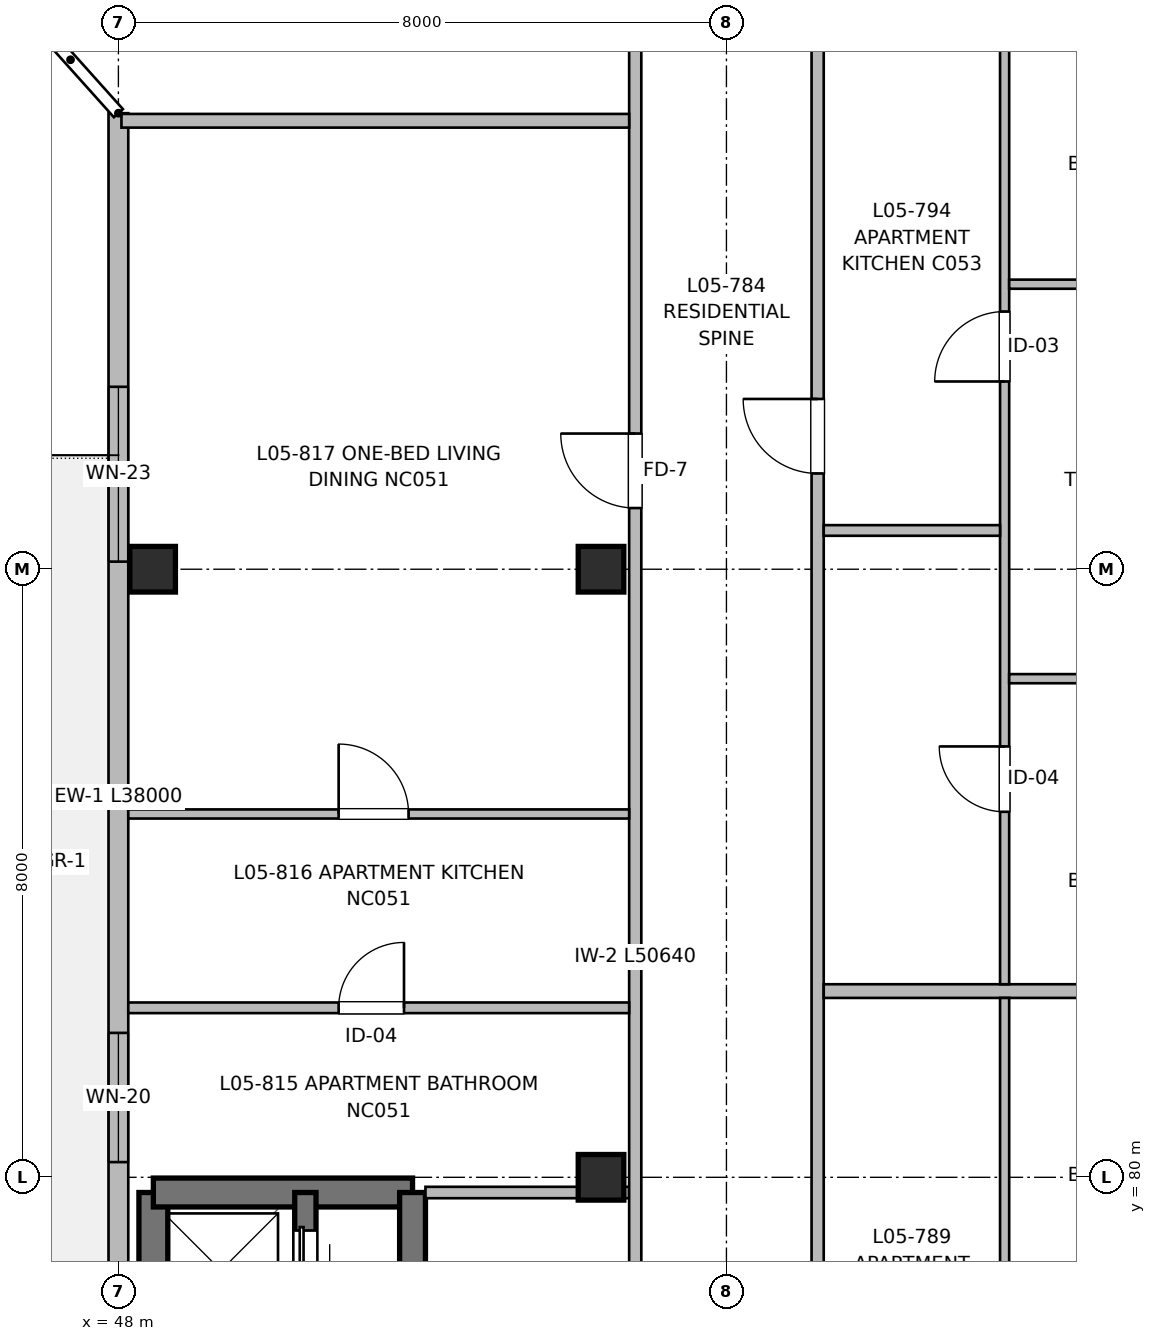
"""IFC4 building model, lengths in metres.
Left out: names, types, materials, properties, quantities, classifications, styles, units other than length and angle.
Written with IfcOpenShell. Run it as: python <this file> out.ifc"""

import sys

from ifc_helpers import new_model, si_unit, direction, frame, frame_2d, origin, origin_2d, place, context, subcontext, project, spatial, rectangle, extrude, element, fill, save


model = new_model("IFC4")
c1 = context("Model", 3, precision=1e-05, world=origin(), true_north=direction((0.0, 1.0)))
c2 = subcontext(c1, "Body", "Model", "MODEL_VIEW")
j1 = project(units=[si_unit("LENGTHUNIT", "METRE"), si_unit("PLANEANGLEUNIT", "RADIAN")], contexts=[c1])
p1 = place(None, origin())
s1 = spatial("IfcSite", under=j1, at=p1, CompositionType="ELEMENT")
p2 = place(p1, origin())
s2 = spatial("IfcBuilding", under=s1, at=p2, CompositionType="ELEMENT")
p3 = place(p2, frame((0.0, 0.0, 16.96)))
s3 = spatial("IfcBuildingStorey", under=s2, at=p3, CompositionType="ELEMENT", Elevation=16.96)
for number, where, z_axis, x_axis in (
    (1, (48.45, 88.0, 0.0), (0.0, 0.0, 1.0), (1.0, 0.0, 0.0)),
    (2, (54.35, 80.0, 0.0), (0.0, 0.0, 1.0), (1.0, 0.0, 0.0)),
    (3, (54.35, 88.0, 0.0), (0.0, 0.0, 1.0), (1.0, 0.0, 0.0)),
):
    element("IfcColumn", number, at=place(p3, frame(where, z_axis=z_axis, x_axis=x_axis)), inside=s3, PredefinedType="COLUMN", context=c2, shape_type="SweptSolid", body=[
        extrude(rectangle(XDim=0.6, YDim=0.6, at=origin_2d()), origin(), (0.0, 0.0, 1.0), 3.2),
    ])
p4 = place(p3, frame((48.46, 67.35, 0.0), z_axis=(0.0, 0.0, 1.0), x_axis=(0.0, 1.0, 0.0)))
e4 = element("IfcWall", 4, at=p4, inside=s3, PredefinedType="SHEAR", context=c2, shape_type="SweptSolid", body=[
    extrude(rectangle(XDim=12.45, YDim=0.38, at=frame_2d((6.225, 0.0))), origin(), (0.0, 0.0, 1.0), 3.2),
])
p5 = place(p4, frame((2.2, 0.0, 0.97)))
e5 = element("IfcOpeningElement", 5, at=p5, cuts=e4, PredefinedType="OPENING", context=c2, shape_type="SweptSolid", body=[
    extrude(rectangle(XDim=0.95, YDim=1.25, at=frame_2d((0.475, 0.625))), frame((0.0, 0.2, 0.0), z_axis=(0.0, -1.0, 0.0), x_axis=(1.0, 0.0, 0.0)), (0.0, 0.0, 1.0), 0.4),
])
p6 = place(p3, frame((48.46, 79.8, 0.0), z_axis=(0.0, 0.0, 1.0), x_axis=(1.0, 0.0, 0.0)))
e6 = element("IfcWall", 6, at=p6, inside=s3, PredefinedType="SHEAR", context=c2, shape_type="SweptSolid", body=[
    extrude(rectangle(XDim=3.41, YDim=0.38, at=frame_2d((1.705, 0.0))), origin(), (0.0, 0.0, 1.0), 3.2),
])
p7 = place(p3, frame((51.87, 79.8, 0.0), z_axis=(0.0, 0.0, 1.0), x_axis=(0.0, -1.0, 0.0)))
e7 = element("IfcWall", 7, at=p7, inside=s3, PredefinedType="SHEAR", context=c2, shape_type="SweptSolid", body=[
    extrude(rectangle(XDim=12.45, YDim=0.34, at=frame_2d((6.225, 0.0))), origin(), (0.0, 0.0, 1.0), 3.2),
])
p8 = place(p7, frame((10.85, 0.0, 0.0)))
e8 = element("IfcOpeningElement", 8, at=p8, cuts=e7, PredefinedType="OPENING", context=c2, shape_type="SweptSolid", body=[
    extrude(rectangle(XDim=1.05, YDim=2.15, at=frame_2d((0.525, 1.075))), frame((0.0, 0.18, 0.0), z_axis=(0.0, -1.0, 0.0), x_axis=(1.0, 0.0, 0.0)), (0.0, 0.0, 1.0), 0.36),
])
p9 = place(p3, frame((50.46, 74.55, 0.0), z_axis=(0.0, 0.0, 1.0), x_axis=(0.0, 1.0, 0.0)))
e9 = element("IfcWall", 9, at=p9, inside=s3, PredefinedType="SHEAR", context=c2, shape_type="SweptSolid", body=[
    extrude(rectangle(XDim=5.25, YDim=0.28, at=frame_2d((2.625, 0.0))), origin(), (0.0, 0.0, 1.0), 3.2),
])
p10 = place(p9, frame((1.15, 0.0, 0.0)))
e10 = element("IfcOpeningElement", 10, at=p10, cuts=e9, PredefinedType="OPENING", context=c2, shape_type="SweptSolid", body=[
    extrude(rectangle(XDim=1.0, YDim=2.15, at=frame_2d((0.5, 1.075))), frame((0.0, 0.15, 0.0), z_axis=(0.0, -1.0, 0.0), x_axis=(1.0, 0.0, 0.0)), (0.0, 0.0, 1.0), 0.3),
])
p11 = place(p9, frame((3.85, 0.0, 0.0)))
e11 = element("IfcOpeningElement", 11, at=p11, cuts=e9, PredefinedType="OPENING", context=c2, shape_type="SweptSolid", body=[
    extrude(rectangle(XDim=0.9, YDim=2.15, at=frame_2d((0.45, 1.075))), frame((0.0, 0.15, 0.0), z_axis=(0.0, -1.0, 0.0), x_axis=(1.0, 0.0, 0.0)), (0.0, 0.0, 1.0), 0.3),
])
p12 = place(p3, frame((48.0, 56.0, 0.0), z_axis=(0.0, 0.0, 1.0), x_axis=(0.0, 1.0, 0.0)))
e12 = element("IfcWall", 12, at=p12, inside=s3, PredefinedType="SOLIDWALL", context=c2, shape_type="SweptSolid", body=[
    extrude(rectangle(XDim=38.0, YDim=0.26, at=frame_2d((19.0, 0.0))), origin(), (0.0, 0.0, 1.0), 2.98),
])
p13 = place(p12, frame((4.15, 0.0, 0.0)))
e13 = element("IfcOpeningElement", 13, at=p13, cuts=e12, PredefinedType="OPENING", context=c2, shape_type="SweptSolid", body=[
    extrude(rectangle(XDim=1.2, YDim=2.2, at=frame_2d((0.6, 1.1))), frame((0.0, 0.14, 0.0), z_axis=(0.0, -1.0, 0.0), x_axis=(1.0, 0.0, 0.0)), (0.0, 0.0, 1.0), 0.28),
])
p14 = place(p12, frame((6.05, 0.0, 0.72)))
e14 = element("IfcOpeningElement", 14, at=p14, cuts=e12, PredefinedType="OPENING", context=c2, shape_type="SweptSolid", body=[
    extrude(rectangle(XDim=1.68, YDim=1.5, at=frame_2d((0.84, 0.75))), frame((0.0, 0.14, 0.0), z_axis=(0.0, -1.0, 0.0), x_axis=(1.0, 0.0, 0.0)), (0.0, 0.0, 1.0), 0.28),
])
p15 = place(p12, frame((12.9, 0.0, 0.47)))
e15 = element("IfcOpeningElement", 15, at=p15, cuts=e12, PredefinedType="OPENING", context=c2, shape_type="SweptSolid", body=[
    extrude(rectangle(XDim=2.7, YDim=1.75, at=frame_2d((1.35, 0.875))), frame((0.0, 0.14, 0.0), z_axis=(0.0, -1.0, 0.0), x_axis=(1.0, 0.0, 0.0)), (0.0, 0.0, 1.0), 0.28),
])
p16 = place(p12, frame((24.2, 0.0, 0.72)))
e16 = element("IfcOpeningElement", 16, at=p16, cuts=e12, PredefinedType="OPENING", context=c2, shape_type="SweptSolid", body=[
    extrude(rectangle(XDim=1.7, YDim=1.5, at=frame_2d((0.85, 0.75))), frame((0.0, 0.14, 0.0), z_axis=(0.0, -1.0, 0.0), x_axis=(1.0, 0.0, 0.0)), (0.0, 0.0, 1.0), 0.28),
])
p17 = place(p12, frame((32.1, 0.0, 0.57)))
e17 = element("IfcOpeningElement", 17, at=p17, cuts=e12, PredefinedType="OPENING", context=c2, shape_type="SweptSolid", body=[
    extrude(rectangle(XDim=2.3, YDim=1.65, at=frame_2d((1.15, 0.825))), frame((0.0, 0.14, 0.0), z_axis=(0.0, -1.0, 0.0), x_axis=(1.0, 0.0, 0.0)), (0.0, 0.0, 1.0), 0.28),
])
p18 = place(p3, frame((52.04, 79.8, 0.0), z_axis=(0.0, 0.0, 1.0), x_axis=(1.0, 0.0, 0.0)))
e18 = element("IfcWall", 18, at=p18, inside=s3, PredefinedType="PARTITIONING", context=c2, shape_type="SweptSolid", body=[
    extrude(rectangle(XDim=2.68, YDim=0.15, at=frame_2d((1.34, 0.0))), origin(), (0.0, 0.0, 1.0), 2.935),
])
p19 = place(p3, frame((54.8, 56.16, 0.0), z_axis=(0.0, 0.0, 1.0), x_axis=(0.0, 1.0, 0.0)))
e19 = element("IfcWall", 19, at=p19, inside=s3, PredefinedType="PARTITIONING", context=c2, shape_type="SweptSolid", body=[
    extrude(rectangle(XDim=50.64, YDim=0.16, at=frame_2d((25.32, 0.0))), origin(), (0.0, 0.0, 1.0), 2.935),
])
p20 = place(p19, frame((12.84, 0.0, 0.0)))
e20 = element("IfcOpeningElement", 20, at=p20, cuts=e19, PredefinedType="OPENING", context=c2, shape_type="SweptSolid", body=[
    extrude(rectangle(XDim=1.1, YDim=2.15, at=frame_2d((0.55, 1.075))), frame((0.0, 0.09, 0.0), z_axis=(0.0, -1.0, 0.0), x_axis=(1.0, 0.0, 0.0)), (0.0, 0.0, 1.0), 0.18),
])
p21 = place(p19, frame((19.24, 0.0, 0.0)))
e21 = element("IfcOpeningElement", 21, at=p21, cuts=e19, PredefinedType="OPENING", context=c2, shape_type="SweptSolid", body=[
    extrude(rectangle(XDim=1.6, YDim=2.15, at=frame_2d((0.8, 1.075))), frame((0.0, 0.09, 0.0), z_axis=(0.0, -1.0, 0.0), x_axis=(1.0, 0.0, 0.0)), (0.0, 0.0, 1.0), 0.18),
])
p22 = place(p19, frame((1.8, 0.0, 0.0)))
e22 = element("IfcOpeningElement", 22, at=p22, cuts=e19, PredefinedType="OPENING", context=c2, shape_type="SweptSolid", body=[
    extrude(rectangle(XDim=0.96, YDim=2.15, at=frame_2d((0.48, 1.075))), frame((0.0, 0.09, 0.0), z_axis=(0.0, -1.0, 0.0), x_axis=(1.0, 0.0, 0.0)), (0.0, 0.0, 1.0), 0.18),
])
p23 = place(p19, frame((32.645, 0.0, 0.0)))
e23 = element("IfcOpeningElement", 23, at=p23, cuts=e19, PredefinedType="OPENING", context=c2, shape_type="SweptSolid", body=[
    extrude(rectangle(XDim=0.98, YDim=2.15, at=frame_2d((0.49, 1.075))), frame((0.0, 0.09, 0.0), z_axis=(0.0, -1.0, 0.0), x_axis=(1.0, 0.0, 0.0)), (0.0, 0.0, 1.0), 0.18),
])
p24 = place(p19, frame((41.255, 0.0, 0.0)))
e24 = element("IfcOpeningElement", 24, at=p24, cuts=e19, PredefinedType="OPENING", context=c2, shape_type="SweptSolid", body=[
    extrude(rectangle(XDim=0.98, YDim=2.15, at=frame_2d((0.49, 1.075))), frame((0.0, 0.09, 0.0), z_axis=(0.0, -1.0, 0.0), x_axis=(1.0, 0.0, 0.0)), (0.0, 0.0, 1.0), 0.18),
])
p25 = place(p3, frame((57.2, 56.16, 0.0), z_axis=(0.0, 0.0, 1.0), x_axis=(0.0, 1.0, 0.0)))
e25 = element("IfcWall", 25, at=p25, inside=s3, PredefinedType="PARTITIONING", context=c2, shape_type="SweptSolid", body=[
    extrude(rectangle(XDim=50.64, YDim=0.16, at=frame_2d((25.32, 0.0))), origin(), (0.0, 0.0, 1.0), 2.935),
])
p26 = place(p25, frame((5.27, 0.0, 0.0)))
e26 = element("IfcOpeningElement", 26, at=p26, cuts=e25, PredefinedType="OPENING", context=c2, shape_type="SweptSolid", body=[
    extrude(rectangle(XDim=1.5, YDim=2.2, at=frame_2d((0.75, 1.1))), frame((0.0, 0.09, 0.0), z_axis=(0.0, -1.0, 0.0), x_axis=(1.0, 0.0, 0.0)), (0.0, 0.0, 1.0), 0.18),
])
p27 = place(p25, frame((19.4, 0.0, 0.0)))
e27 = element("IfcOpeningElement", 27, at=p27, cuts=e25, PredefinedType="OPENING", context=c2, shape_type="SweptSolid", body=[
    extrude(rectangle(XDim=1.02, YDim=2.15, at=frame_2d((0.51, 1.075))), frame((0.0, 0.09, 0.0), z_axis=(0.0, -1.0, 0.0), x_axis=(1.0, 0.0, 0.0)), (0.0, 0.0, 1.0), 0.18),
])
p28 = place(p25, frame((33.1, 0.0, 0.0)))
e28 = element("IfcOpeningElement", 28, at=p28, cuts=e25, PredefinedType="OPENING", context=c2, shape_type="SweptSolid", body=[
    extrude(rectangle(XDim=0.98, YDim=2.15, at=frame_2d((0.49, 1.075))), frame((0.0, 0.09, 0.0), z_axis=(0.0, -1.0, 0.0), x_axis=(1.0, 0.0, 0.0)), (0.0, 0.0, 1.0), 0.18),
])
p29 = place(p25, frame((45.35, 0.0, 0.0)))
e29 = element("IfcOpeningElement", 29, at=p29, cuts=e25, PredefinedType="OPENING", context=c2, shape_type="SweptSolid", body=[
    extrude(rectangle(XDim=0.98, YDim=2.15, at=frame_2d((0.49, 1.075))), frame((0.0, 0.09, 0.0), z_axis=(0.0, -1.0, 0.0), x_axis=(1.0, 0.0, 0.0)), (0.0, 0.0, 1.0), 0.18),
])
p30 = place(p3, frame((57.28, 82.45, 0.0), z_axis=(0.0, 0.0, 1.0), x_axis=(1.0, 0.0, 0.0)))
e30 = element("IfcWall", 30, at=p30, inside=s3, PredefinedType="PARTITIONING", context=c2, shape_type="SweptSolid", body=[
    extrude(rectangle(XDim=6.59, YDim=0.18, at=frame_2d((3.295, 0.0))), origin(), (0.0, 0.0, 1.0), 2.935),
])
p31 = place(p3, frame((59.66, 68.38, 0.0), z_axis=(0.0, 0.0, 1.0), x_axis=(0.0, 1.0, 0.0)))
e31 = element("IfcWall", 31, at=p31, inside=s3, PredefinedType="PARTITIONING", context=c2, shape_type="SweptSolid", body=[
    extrude(rectangle(XDim=13.98, YDim=0.12, at=frame_2d((6.99, 0.0))), origin(), (0.0, 0.0, 1.0), 2.935),
])
p32 = place(p31, frame((2.443, 0.0, 0.0)))
e32 = element("IfcOpeningElement", 32, at=p32, cuts=e31, PredefinedType="OPENING", context=c2, shape_type="SweptSolid", body=[
    extrude(rectangle(XDim=0.94, YDim=2.1, at=frame_2d((0.47, 1.05))), frame((0.0, 0.07, 0.0), z_axis=(0.0, -1.0, 0.0), x_axis=(1.0, 0.0, 0.0)), (0.0, 0.0, 1.0), 0.14),
])
p33 = place(p31, frame((8.544, 0.0, 0.0)))
e33 = element("IfcOpeningElement", 33, at=p33, cuts=e31, PredefinedType="OPENING", context=c2, shape_type="SweptSolid", body=[
    extrude(rectangle(XDim=0.92, YDim=2.1, at=frame_2d((0.46, 1.05))), frame((0.0, 0.07, 0.0), z_axis=(0.0, -1.0, 0.0), x_axis=(1.0, 0.0, 0.0)), (0.0, 0.0, 1.0), 0.14),
])
p34 = place(p3, frame((59.66, 82.54, 0.0), z_axis=(0.0, 0.0, 1.0), x_axis=(0.0, 1.0, 0.0)))
e34 = element("IfcWall", 34, at=p34, inside=s3, PredefinedType="PARTITIONING", context=c2, shape_type="SweptSolid", body=[
    extrude(rectangle(XDim=12.97, YDim=0.12, at=frame_2d((6.485, 0.0))), origin(), (0.0, 0.0, 1.0), 2.935),
])
p35 = place(p34, frame((2.269, 0.0, 0.0)))
e35 = element("IfcOpeningElement", 35, at=p35, cuts=e34, PredefinedType="OPENING", context=c2, shape_type="SweptSolid", body=[
    extrude(rectangle(XDim=0.86, YDim=2.1, at=frame_2d((0.43, 1.05))), frame((0.0, 0.07, 0.0), z_axis=(0.0, -1.0, 0.0), x_axis=(1.0, 0.0, 0.0)), (0.0, 0.0, 1.0), 0.14),
])
p36 = place(p34, frame((7.93, 0.0, 0.0)))
e36 = element("IfcOpeningElement", 36, at=p36, cuts=e34, PredefinedType="OPENING", context=c2, shape_type="SweptSolid", body=[
    extrude(rectangle(XDim=0.92, YDim=2.1, at=frame_2d((0.46, 1.05))), frame((0.0, 0.07, 0.0), z_axis=(0.0, -1.0, 0.0), x_axis=(1.0, 0.0, 0.0)), (0.0, 0.0, 1.0), 0.14),
])
p37 = place(p3, frame((57.28, 88.51, 0.0), z_axis=(0.0, 0.0, 1.0), x_axis=(1.0, 0.0, 0.0)))
e37 = element("IfcWall", 37, at=p37, inside=s3, PredefinedType="PARTITIONING", context=c2, shape_type="SweptSolid", body=[
    extrude(rectangle(XDim=2.32, YDim=0.14, at=frame_2d((1.16, 0.0))), origin(), (0.0, 0.0, 1.0), 2.935),
])
p38 = place(p3, frame((59.72, 86.56, 0.0), z_axis=(0.0, 0.0, 1.0), x_axis=(1.0, 0.0, 0.0)))
e38 = element("IfcWall", 38, at=p38, inside=s3, PredefinedType="PARTITIONING", context=c2, shape_type="SweptSolid", body=[
    extrude(rectangle(XDim=4.15, YDim=0.12, at=frame_2d((2.075, 0.0))), origin(), (0.0, 0.0, 1.0), 2.935),
])
p39 = place(p38, frame((1.625, 0.0, 0.0)))
e39 = element("IfcOpeningElement", 39, at=p39, cuts=e38, PredefinedType="OPENING", context=c2, shape_type="SweptSolid", body=[
    extrude(rectangle(XDim=0.9, YDim=2.1, at=frame_2d((0.45, 1.05))), frame((0.0, 0.07, 0.0), z_axis=(0.0, -1.0, 0.0), x_axis=(1.0, 0.0, 0.0)), (0.0, 0.0, 1.0), 0.14),
])
p40 = place(p3, frame((59.72, 91.75, 0.0), z_axis=(0.0, 0.0, 1.0), x_axis=(1.0, 0.0, 0.0)))
e40 = element("IfcWall", 40, at=p40, inside=s3, PredefinedType="PARTITIONING", context=c2, shape_type="SweptSolid", body=[
    extrude(rectangle(XDim=7.237, YDim=0.12, at=frame_2d((3.619, 0.0))), origin(), (0.0, 0.0, 1.0), 2.935),
])
p41 = place(p40, frame((1.635, 0.0, 0.0)))
e41 = element("IfcOpeningElement", 41, at=p41, cuts=e40, PredefinedType="OPENING", context=c2, shape_type="SweptSolid", body=[
    extrude(rectangle(XDim=0.88, YDim=2.1, at=frame_2d((0.44, 1.05))), frame((0.0, 0.07, 0.0), z_axis=(0.0, -1.0, 0.0), x_axis=(1.0, 0.0, 0.0)), (0.0, 0.0, 1.0), 0.14),
])
p42 = place(p3, frame((48.04, 93.9, 0.0), z_axis=(0.0, 0.0, 1.0), x_axis=(1.0, 0.0, 0.0)))
e42 = element("IfcWall", 42, at=p42, inside=s3, PredefinedType="PARTITIONING", context=c2, shape_type="SweptSolid", body=[
    extrude(rectangle(XDim=6.68, YDim=0.18, at=frame_2d((3.34, 0.0))), origin(), (0.0, 0.0, 1.0), 2.935),
])
p43 = place(p3, frame((48.13, 82.23, 0.0), z_axis=(0.0, 0.0, 1.0), x_axis=(1.0, 0.0, 0.0)))
e43 = element("IfcWall", 43, at=p43, inside=s3, PredefinedType="PARTITIONING", context=c2, shape_type="SweptSolid", body=[
    extrude(rectangle(XDim=6.59, YDim=0.14, at=frame_2d((3.295, 0.0))), origin(), (0.0, 0.0, 1.0), 2.935),
])
p44 = place(p43, frame((2.768, 0.0, 0.0)))
e44 = element("IfcOpeningElement", 44, at=p44, cuts=e43, PredefinedType="OPENING", context=c2, shape_type="SweptSolid", body=[
    extrude(rectangle(XDim=0.86, YDim=2.1, at=frame_2d((0.43, 1.05))), frame((0.0, 0.08, 0.0), z_axis=(0.0, -1.0, 0.0), x_axis=(1.0, 0.0, 0.0)), (0.0, 0.0, 1.0), 0.16),
])
p45 = place(p3, frame((48.13, 84.78, 0.0), z_axis=(0.0, 0.0, 1.0), x_axis=(1.0, 0.0, 0.0)))
e45 = element("IfcWall", 45, at=p45, inside=s3, PredefinedType="PARTITIONING", context=c2, shape_type="SweptSolid", body=[
    extrude(rectangle(XDim=6.59, YDim=0.12, at=frame_2d((3.295, 0.0))), origin(), (0.0, 0.0, 1.0), 2.935),
])
p46 = place(p45, frame((2.768, 0.0, 0.0)))
e46 = element("IfcOpeningElement", 46, at=p46, cuts=e45, PredefinedType="OPENING", context=c2, shape_type="SweptSolid", body=[
    extrude(rectangle(XDim=0.92, YDim=2.1, at=frame_2d((0.46, 1.05))), frame((0.0, 0.07, 0.0), z_axis=(0.0, -1.0, 0.0), x_axis=(1.0, 0.0, 0.0)), (0.0, 0.0, 1.0), 0.14),
])
p47 = place(p11, origin())
e47 = element("IfcDoor", 47, at=p47, inside=s3, OperationType="SLIDING_TO_RIGHT", PredefinedType="DOOR", context=c2, shape_type="SweptSolid", body=[
    extrude(rectangle(XDim=0.9, YDim=2.15, at=frame_2d((0.45, 1.075))), frame((0.0, 0.025, 0.0), z_axis=(0.0, -1.0, 0.0), x_axis=(1.0, 0.0, 0.0)), (0.0, 0.0, 1.0), 0.05),
])
fill(e11, e47)
p48 = place(p16, origin())
e48 = element("IfcWindow", 48, at=p48, inside=s3, PartitioningType="SINGLE_PANEL", PredefinedType="WINDOW", context=c2, shape_type="SweptSolid", body=[
    extrude(rectangle(XDim=1.7, YDim=1.5, at=frame_2d((0.85, 0.75))), frame((0.0, 0.03, 0.0), z_axis=(0.0, -1.0, 0.0), x_axis=(1.0, 0.0, 0.0)), (0.0, 0.0, 1.0), 0.06),
])
fill(e16, e48)
p49 = place(p17, origin())
e49 = element("IfcWindow", 49, at=p49, inside=s3, PartitioningType="SINGLE_PANEL", PredefinedType="WINDOW", context=c2, shape_type="SweptSolid", body=[
    extrude(rectangle(XDim=2.3, YDim=1.65, at=frame_2d((1.15, 0.825))), frame((0.0, 0.03, 0.0), z_axis=(0.0, -1.0, 0.0), x_axis=(1.0, 0.0, 0.0)), (0.0, 0.0, 1.0), 0.06),
])
fill(e17, e49)
p50 = place(p35, origin())
e50 = element("IfcDoor", 50, at=p50, inside=s3, OperationType="SINGLE_SWING_RIGHT", PredefinedType="DOOR", context=c2, shape_type="SweptSolid", body=[
    extrude(rectangle(XDim=0.86, YDim=2.1, at=frame_2d((0.43, 1.05))), frame((0.0, 0.025, 0.0), z_axis=(0.0, -1.0, 0.0), x_axis=(1.0, 0.0, 0.0)), (0.0, 0.0, 1.0), 0.05),
])
fill(e35, e50)
p51 = place(p36, origin())
e51 = element("IfcDoor", 51, at=p51, inside=s3, OperationType="SINGLE_SWING_LEFT", PredefinedType="DOOR", context=c2, shape_type="SweptSolid", body=[
    extrude(rectangle(XDim=0.92, YDim=2.1, at=frame_2d((0.46, 1.05))), frame((0.0, 0.025, 0.0), z_axis=(0.0, -1.0, 0.0), x_axis=(1.0, 0.0, 0.0)), (0.0, 0.0, 1.0), 0.05),
])
fill(e36, e51)
p52 = place(p28, origin())
e52 = element("IfcDoor", 52, at=p52, inside=s3, OperationType="SINGLE_SWING_RIGHT", PredefinedType="DOOR", context=c2, shape_type="SweptSolid", body=[
    extrude(rectangle(XDim=0.98, YDim=2.15, at=frame_2d((0.49, 1.075))), frame((0.0, 0.025, 0.0), z_axis=(0.0, -1.0, 0.0), x_axis=(1.0, 0.0, 0.0)), (0.0, 0.0, 1.0), 0.05),
])
fill(e28, e52)
p53 = place(p44, origin())
e53 = element("IfcDoor", 53, at=p53, inside=s3, OperationType="SINGLE_SWING_RIGHT", PredefinedType="DOOR", context=c2, shape_type="SweptSolid", body=[
    extrude(rectangle(XDim=0.86, YDim=2.1, at=frame_2d((0.43, 1.05))), frame((0.0, 0.025, 0.0), z_axis=(0.0, -1.0, 0.0), x_axis=(1.0, 0.0, 0.0)), (0.0, 0.0, 1.0), 0.05),
])
fill(e44, e53)
p54 = place(p46, origin())
e54 = element("IfcDoor", 54, at=p54, inside=s3, OperationType="SINGLE_SWING_LEFT", PredefinedType="DOOR", context=c2, shape_type="SweptSolid", body=[
    extrude(rectangle(XDim=0.92, YDim=2.1, at=frame_2d((0.46, 1.05))), frame((0.0, 0.025, 0.0), z_axis=(0.0, -1.0, 0.0), x_axis=(1.0, 0.0, 0.0)), (0.0, 0.0, 1.0), 0.05),
])
fill(e46, e54)
p55 = place(p23, origin())
e55 = element("IfcDoor", 55, at=p55, inside=s3, OperationType="SINGLE_SWING_RIGHT", PredefinedType="DOOR", context=c2, shape_type="SweptSolid", body=[
    extrude(rectangle(XDim=0.98, YDim=2.15, at=frame_2d((0.49, 1.075))), frame((0.0, 0.025, 0.0), z_axis=(0.0, -1.0, 0.0), x_axis=(1.0, 0.0, 0.0)), (0.0, 0.0, 1.0), 0.05),
])
fill(e23, e55)
save(model, sys.argv[1])
